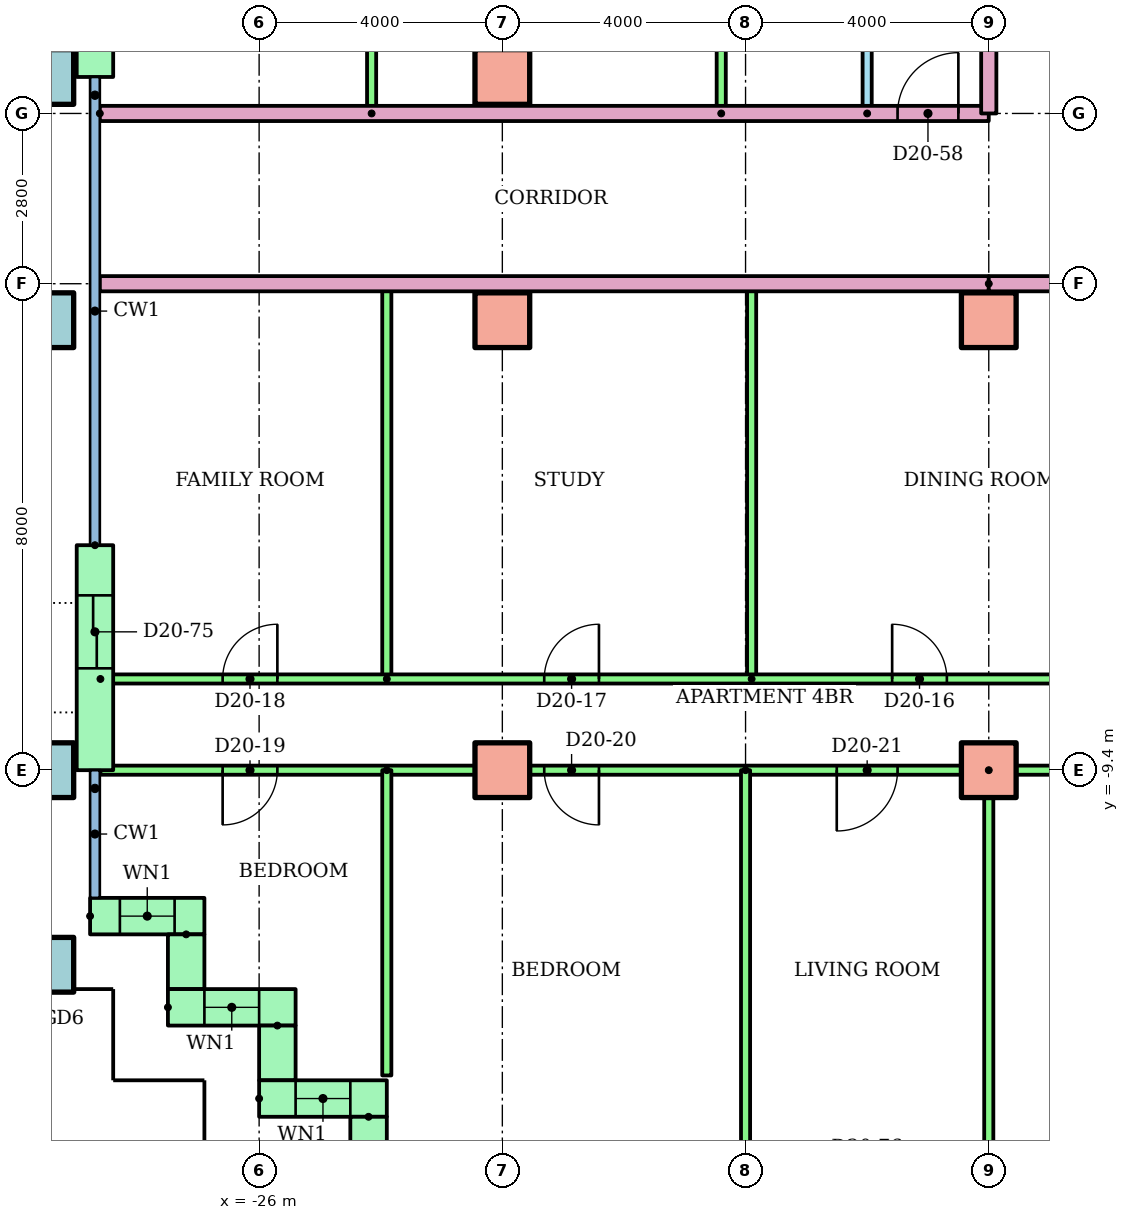
"""IFC4 building model, lengths in metres.
Left out: names, types, materials, properties, quantities, classifications, styles, units other than length and angle.
Written with IfcOpenShell. Run it as: python <this file> out.ifc"""

import sys

from ifc_helpers import new_model, si_unit, direction, frame, frame_2d, origin, origin_2d, place, context, subcontext, project, spatial, rectangle, hollow_rectangle, extrude, element, fill, save


model = new_model("IFC4")
c1 = context("Model", 3, precision=1e-05, world=origin(), true_north=direction((0.0, 1.0)))
c2 = subcontext(c1, "Body", "Model", "MODEL_VIEW")
j1 = project(units=[si_unit("LENGTHUNIT", "METRE"), si_unit("PLANEANGLEUNIT", "RADIAN")], contexts=[c1])
p1 = place(None, origin())
s1 = spatial("IfcSite", under=j1, at=p1, CompositionType="ELEMENT")
p2 = place(p1, origin())
s2 = spatial("IfcBuilding", under=s1, at=p2, CompositionType="ELEMENT")
p3 = place(p2, frame((0.0, 0.0, 80.7)))
s3 = spatial("IfcBuildingStorey", under=s2, at=p3, CompositionType="ELEMENT", Elevation=80.7)
for number, where in (
    (1, (-29.5, -12.6, 0.0)),
    (2, (-29.5, -9.4, 0.0)),
):
    element("IfcColumn", number, at=place(p3, frame(where)), inside=s3, PredefinedType="COLUMN", context=c2, shape_type="SweptSolid", body=[
        extrude(hollow_rectangle(XDim=0.9, YDim=0.9, WallThickness=0.045, at=origin_2d()), origin(), (0.0, 0.0, 1.0), 3.2),
    ])
for number, where in (
    (3, (-22.0, -9.4, 0.0)),
    (4, (-14.0, -9.4, 0.0)),
):
    element("IfcColumn", number, at=place(p3, frame(where)), inside=s3, PredefinedType="COLUMN", context=c2, shape_type="SweptSolid", body=[
        extrude(rectangle(XDim=0.9, YDim=0.9, at=origin_2d()), origin(), (0.0, 0.0, 1.0), 3.2),
    ])
p4 = place(p3, frame((-29.5, -2.0, 0.0)))
e5 = element("IfcColumn", 5, at=p4, inside=s3, PredefinedType="COLUMN", context=c2, shape_type="SweptSolid", body=[
    extrude(hollow_rectangle(XDim=0.9, YDim=0.9, WallThickness=0.045, at=origin_2d()), origin(), (0.0, 0.0, 1.0), 3.2),
])
for number, where in (
    (6, (-22.0, -2.0, 0.0)),
    (7, (-14.0, -2.0, 0.0)),
):
    element("IfcColumn", number, at=place(p3, frame(where)), inside=s3, PredefinedType="COLUMN", context=c2, shape_type="SweptSolid", body=[
        extrude(rectangle(XDim=0.9, YDim=0.9, at=origin_2d()), origin(), (0.0, 0.0, 1.0), 3.2),
    ])
p5 = place(p3, frame((-29.5, 2.0, 0.0)))
e8 = element("IfcColumn", 8, at=p5, inside=s3, PredefinedType="COLUMN", context=c2, shape_type="SweptSolid", body=[
    extrude(hollow_rectangle(XDim=0.9, YDim=0.9, WallThickness=0.045, at=origin_2d()), origin(), (0.0, 0.0, 1.0), 3.2),
])
p6 = place(p3, frame((-22.0, 2.0, 0.0)))
e9 = element("IfcColumn", 9, at=p6, inside=s3, PredefinedType="COLUMN", context=c2, shape_type="SweptSolid", body=[
    extrude(rectangle(XDim=0.9, YDim=0.9, at=origin_2d()), origin(), (0.0, 0.0, 1.0), 3.2),
])
p7 = place(p3, frame((-28.7, 6.5, 0.0), z_axis=(0.0, 0.0, 1.0), x_axis=(0.0, -1.0, 0.0)))
e10 = element("IfcWall", 10, at=p7, inside=s3, PredefinedType="STANDARD", context=c2, shape_type="SweptSolid", body=[
    extrude(rectangle(XDim=4.5, YDim=0.6, at=frame_2d((2.25, 0.0))), origin(), (0.0, 0.0, 1.0), 2.92),
])
p8 = place(p7, frame((1.65, 0.0, 0.0)))
e11 = element("IfcOpeningElement", 11, at=p8, cuts=e10, PredefinedType="OPENING", context=c2, shape_type="SweptSolid", body=[
    extrude(rectangle(XDim=1.2, YDim=2.1, at=frame_2d((0.6, 1.05))), frame((0.0, 0.31, 0.0), z_axis=(0.0, -1.0, 0.0), x_axis=(1.0, 0.0, 0.0)), (0.0, 0.0, 1.0), 0.62),
])
p9 = place(p3, frame((-28.7, -5.7, 0.0), z_axis=(0.0, 0.0, 1.0), x_axis=(0.0, -1.0, 0.0)))
e12 = element("IfcWall", 12, at=p9, inside=s3, PredefinedType="STANDARD", context=c2, shape_type="SweptSolid", body=[
    extrude(rectangle(XDim=3.7, YDim=0.6, at=frame_2d((1.85, 0.0))), origin(), (0.0, 0.0, 1.0), 2.92),
])
p10 = place(p9, frame((0.825, 0.0, 0.0)))
e13 = element("IfcOpeningElement", 13, at=p10, cuts=e12, PredefinedType="OPENING", context=c2, shape_type="SweptSolid", body=[
    extrude(rectangle(XDim=1.2, YDim=2.1, at=frame_2d((0.6, 1.05))), frame((0.0, 0.31, 0.0), z_axis=(0.0, -1.0, 0.0), x_axis=(1.0, 0.0, 0.0)), (0.0, 0.0, 1.0), 0.62),
])
p11 = place(p3, frame((-28.78, -11.8, 0.0)))
e14 = element("IfcWall", 14, at=p11, inside=s3, PredefinedType="STANDARD", context=c2, shape_type="SweptSolid", body=[
    extrude(rectangle(XDim=1.88, YDim=0.6, at=frame_2d((0.94, 0.0))), origin(), (0.0, 0.0, 1.0), 2.92),
])
p12 = place(p11, frame((0.49, 0.0, 0.9)))
e15 = element("IfcOpeningElement", 15, at=p12, cuts=e14, PredefinedType="OPENING", context=c2, shape_type="SweptSolid", body=[
    extrude(rectangle(XDim=0.9, YDim=1.5, at=frame_2d((0.45, 0.75))), frame((0.0, 0.31, 0.0), z_axis=(0.0, -1.0, 0.0), x_axis=(1.0, 0.0, 0.0)), (0.0, 0.0, 1.0), 0.62),
])
p13 = place(p3, frame((-27.2, -12.1, 0.0), z_axis=(0.0, 0.0, 1.0), x_axis=(0.0, -1.0, 0.0)))
e16 = element("IfcWall", 16, at=p13, inside=s3, PredefinedType="STANDARD", context=c2, shape_type="SweptSolid", body=[
    extrude(rectangle(XDim=0.9, YDim=0.6, at=frame_2d((0.45, 0.0))), origin(), (0.0, 0.0, 1.0), 2.92),
])
p14 = place(p3, frame((-27.5, -13.3, 0.0)))
e17 = element("IfcWall", 17, at=p14, inside=s3, PredefinedType="STANDARD", context=c2, shape_type="SweptSolid", body=[
    extrude(rectangle(XDim=2.1, YDim=0.6, at=frame_2d((1.05, 0.0))), origin(), (0.0, 0.0, 1.0), 2.92),
])
p15 = place(p14, frame((0.6, 0.0, 0.9)))
e18 = element("IfcOpeningElement", 18, at=p15, cuts=e17, PredefinedType="OPENING", context=c2, shape_type="SweptSolid", body=[
    extrude(rectangle(XDim=0.9, YDim=1.5, at=frame_2d((0.45, 0.75))), frame((0.0, 0.31, 0.0), z_axis=(0.0, -1.0, 0.0), x_axis=(1.0, 0.0, 0.0)), (0.0, 0.0, 1.0), 0.62),
])
p16 = place(p3, frame((-25.7, -13.6, 0.0), z_axis=(0.0, 0.0, 1.0), x_axis=(0.0, -1.0, 0.0)))
e19 = element("IfcWall", 19, at=p16, inside=s3, PredefinedType="STANDARD", context=c2, shape_type="SweptSolid", body=[
    extrude(rectangle(XDim=0.9, YDim=0.6, at=frame_2d((0.45, 0.0))), origin(), (0.0, 0.0, 1.0), 2.92),
])
p17 = place(p3, frame((-26.0, -14.8, 0.0)))
e20 = element("IfcWall", 20, at=p17, inside=s3, PredefinedType="STANDARD", context=c2, shape_type="SweptSolid", body=[
    extrude(rectangle(XDim=2.1, YDim=0.6, at=frame_2d((1.05, 0.0))), origin(), (0.0, 0.0, 1.0), 2.92),
])
p18 = place(p17, frame((0.6, 0.0, 0.9)))
e21 = element("IfcOpeningElement", 21, at=p18, cuts=e20, PredefinedType="OPENING", context=c2, shape_type="SweptSolid", body=[
    extrude(rectangle(XDim=0.9, YDim=1.5, at=frame_2d((0.45, 0.75))), frame((0.0, 0.31, 0.0), z_axis=(0.0, -1.0, 0.0), x_axis=(1.0, 0.0, 0.0)), (0.0, 0.0, 1.0), 0.62),
])
p19 = place(p3, frame((-24.2, -15.1, 0.0), z_axis=(0.0, 0.0, 1.0), x_axis=(0.0, -1.0, 0.0)))
e22 = element("IfcWall", 22, at=p19, inside=s3, PredefinedType="STANDARD", context=c2, shape_type="SweptSolid", body=[
    extrude(rectangle(XDim=1.28, YDim=0.6, at=frame_2d((0.64, 0.0))), origin(), (0.0, 0.0, 1.0), 2.92),
])
for number, where, z_axis, x_axis in (
    (23, (-17.9, -7.9, 0.0), (0.0, 0.0, 1.0), (0.0, 1.0, 0.0)),
    (24, (-23.9, -7.9, 0.0), (0.0, 0.0, 1.0), (0.0, 1.0, 0.0)),
):
    element("IfcWall", number, at=place(p3, frame(where, z_axis=z_axis, x_axis=x_axis)), inside=s3, PredefinedType="PARTITIONING", context=c2, shape_type="SweptSolid", body=[
        extrude(rectangle(XDim=6.5, YDim=0.15, at=frame_2d((3.25, 0.0))), origin(), (0.0, 0.0, 1.0), 2.4),
    ])
p20 = place(p3, frame((-28.61, -7.9, 0.0)))
e25 = element("IfcWall", 25, at=p20, inside=s3, PredefinedType="PARTITIONING", context=c2, shape_type="SweptSolid", body=[
    extrude(rectangle(XDim=20.61, YDim=0.15, at=frame_2d((10.305, 0.0))), origin(), (0.0, 0.0, 1.0), 2.4),
])
p21 = place(p20, frame((13.021, 0.0, 0.0)))
e26 = element("IfcOpeningElement", 26, at=p21, cuts=e25, PredefinedType="OPENING", context=c2, shape_type="SweptSolid", body=[
    extrude(rectangle(XDim=0.9, YDim=2.1, at=frame_2d((0.45, 1.05))), frame((0.0, 0.085, 0.0), z_axis=(0.0, -1.0, 0.0), x_axis=(1.0, 0.0, 0.0)), (0.0, 0.0, 1.0), 0.17),
])
p22 = place(p20, frame((7.299, 0.0, 0.0)))
e27 = element("IfcOpeningElement", 27, at=p22, cuts=e25, PredefinedType="OPENING", context=c2, shape_type="SweptSolid", body=[
    extrude(rectangle(XDim=0.9, YDim=2.1, at=frame_2d((0.45, 1.05))), frame((0.0, 0.085, 0.0), z_axis=(0.0, -1.0, 0.0), x_axis=(1.0, 0.0, 0.0)), (0.0, 0.0, 1.0), 0.17),
])
p23 = place(p20, frame((2.01, 0.0, 0.0)))
e28 = element("IfcOpeningElement", 28, at=p23, cuts=e25, PredefinedType="OPENING", context=c2, shape_type="SweptSolid", body=[
    extrude(rectangle(XDim=0.9, YDim=2.1, at=frame_2d((0.45, 1.05))), frame((0.0, 0.085, 0.0), z_axis=(0.0, -1.0, 0.0), x_axis=(1.0, 0.0, 0.0)), (0.0, 0.0, 1.0), 0.17),
])
p24 = place(p3, frame((-6.0, -9.4, 0.0), z_axis=(0.0, 0.0, 1.0), x_axis=(-1.0, 0.0, 0.0)))
e29 = element("IfcWall", 29, at=p24, inside=s3, PredefinedType="PARTITIONING", context=c2, shape_type="SweptSolid", body=[
    extrude(rectangle(XDim=22.61, YDim=0.15, at=frame_2d((11.305, 0.0))), origin(), (0.0, 0.0, 1.0), 2.4),
])
p25 = place(p24, frame((19.7, 0.0, 0.0)))
e30 = element("IfcOpeningElement", 30, at=p25, cuts=e29, PredefinedType="OPENING", context=c2, shape_type="SweptSolid", body=[
    extrude(rectangle(XDim=0.9, YDim=2.1, at=frame_2d((0.45, 1.05))), frame((0.0, 0.085, 0.0), z_axis=(0.0, -1.0, 0.0), x_axis=(1.0, 0.0, 0.0)), (0.0, 0.0, 1.0), 0.17),
])
p26 = place(p24, frame((14.411, 0.0, 0.0)))
e31 = element("IfcOpeningElement", 31, at=p26, cuts=e29, PredefinedType="OPENING", context=c2, shape_type="SweptSolid", body=[
    extrude(rectangle(XDim=0.9, YDim=2.1, at=frame_2d((0.45, 1.05))), frame((0.0, 0.085, 0.0), z_axis=(0.0, -1.0, 0.0), x_axis=(1.0, 0.0, 0.0)), (0.0, 0.0, 1.0), 0.17),
])
p27 = place(p24, frame((9.5, 0.0, 0.0)))
e32 = element("IfcOpeningElement", 32, at=p27, cuts=e29, PredefinedType="OPENING", context=c2, shape_type="SweptSolid", body=[
    extrude(rectangle(XDim=1.0, YDim=2.1, at=frame_2d((0.5, 1.05))), frame((0.0, 0.085, 0.0), z_axis=(0.0, -1.0, 0.0), x_axis=(1.0, 0.0, 0.0)), (0.0, 0.0, 1.0), 0.17),
])
p28 = place(p24, frame((5.55, 0.0, 0.0)))
e33 = element("IfcOpeningElement", 33, at=p28, cuts=e29, PredefinedType="OPENING", context=c2, shape_type="SweptSolid", body=[
    extrude(rectangle(XDim=0.9, YDim=2.1, at=frame_2d((0.45, 1.05))), frame((0.0, 0.085, 0.0), z_axis=(0.0, -1.0, 0.0), x_axis=(1.0, 0.0, 0.0)), (0.0, 0.0, 1.0), 0.17),
])
p29 = place(p24, frame((1.55, 0.0, 0.0)))
e34 = element("IfcOpeningElement", 34, at=p29, cuts=e29, PredefinedType="OPENING", context=c2, shape_type="SweptSolid", body=[
    extrude(rectangle(XDim=0.9, YDim=2.1, at=frame_2d((0.45, 1.05))), frame((0.0, 0.085, 0.0), z_axis=(0.0, -1.0, 0.0), x_axis=(1.0, 0.0, 0.0)), (0.0, 0.0, 1.0), 0.17),
])
p30 = place(p3, frame((-23.9, -9.4, 0.0), z_axis=(0.0, 0.0, 1.0), x_axis=(0.0, -1.0, 0.0)))
e35 = element("IfcWall", 35, at=p30, inside=s3, PredefinedType="PARTITIONING", context=c2, shape_type="SweptSolid", body=[
    extrude(rectangle(XDim=5.02, YDim=0.15, at=frame_2d((2.51, 0.0))), origin(), (0.0, 0.0, 1.0), 2.4),
])
p31 = place(p3, frame((-18.0, -9.4, 0.0), z_axis=(0.0, 0.0, 1.0), x_axis=(0.0, -1.0, 0.0)))
e36 = element("IfcWall", 36, at=p31, inside=s3, PredefinedType="PARTITIONING", context=c2, shape_type="SweptSolid", body=[
    extrude(rectangle(XDim=6.821, YDim=0.15, at=frame_2d((3.411, 0.0))), origin(), (0.0, 0.0, 1.0), 2.4),
])
p32 = place(p3, frame((-14.0, -9.4, 0.0), z_axis=(0.0, 0.0, 1.0), x_axis=(0.0, -1.0, 0.0)))
e37 = element("IfcWall", 37, at=p32, inside=s3, PredefinedType="PARTITIONING", context=c2, shape_type="SweptSolid", body=[
    extrude(rectangle(XDim=6.81, YDim=0.15, at=frame_2d((3.405, 0.0))), origin(), (0.0, 0.0, 1.0), 2.4),
])
p33 = place(p3, frame((-14.0, -1.4, 0.0), z_axis=(0.0, 0.0, 1.0), x_axis=(-1.0, 0.0, 0.0)))
e38 = element("IfcWall", 38, at=p33, inside=s3, PredefinedType="PARTITIONING", context=c2, shape_type="SweptSolid", body=[
    extrude(rectangle(XDim=14.62, YDim=0.25, at=frame_2d((7.31, 0.0))), origin(), (0.0, 0.0, 1.0), 2.4),
])
p34 = place(p3, frame((-16.0, 1.4, 0.0), z_axis=(0.0, 0.0, 1.0), x_axis=(0.0, 1.0, 0.0)))
e39 = element("IfcWall", 39, at=p34, inside=s3, PredefinedType="PARTITIONING", context=c2, shape_type="SweptSolid", body=[
    extrude(rectangle(XDim=8.9, YDim=0.15, at=frame_2d((4.45, 0.0))), origin(), (0.0, 0.0, 1.0), 2.4),
])
p35 = place(p34, frame((2.05, 0.0, 0.0)))
e40 = element("IfcOpeningElement", 40, at=p35, cuts=e39, PredefinedType="OPENING", context=c2, shape_type="SweptSolid", body=[
    extrude(rectangle(XDim=0.9, YDim=2.1, at=frame_2d((0.45, 1.05))), frame((0.0, 0.085, 0.0), z_axis=(0.0, -1.0, 0.0), x_axis=(1.0, 0.0, 0.0)), (0.0, 0.0, 1.0), 0.17),
])
p36 = place(p34, frame((6.55, 0.0, 0.0)))
e41 = element("IfcOpeningElement", 41, at=p36, cuts=e39, PredefinedType="OPENING", context=c2, shape_type="SweptSolid", body=[
    extrude(rectangle(XDim=0.8, YDim=2.1, at=frame_2d((0.4, 1.05))), frame((0.0, 0.085, 0.0), z_axis=(0.0, -1.0, 0.0), x_axis=(1.0, 0.0, 0.0)), (0.0, 0.0, 1.0), 0.17),
])
for number, where, z_axis, x_axis in (
    (42, (-18.4, 1.4, 0.0), (0.0, 0.0, 1.0), (0.0, 1.0, 0.0)),
    (43, (-24.15, 1.4, 0.0), (0.0, 0.0, 1.0), (0.0, 1.0, 0.0)),
):
    element("IfcWall", number, at=place(p3, frame(where, z_axis=z_axis, x_axis=x_axis)), inside=s3, PredefinedType="PARTITIONING", context=c2, shape_type="SweptSolid", body=[
        extrude(rectangle(XDim=8.9, YDim=0.15, at=frame_2d((4.45, 0.0))), origin(), (0.0, 0.0, 1.0), 2.4),
    ])
p37 = place(p3, frame((-28.62, 1.4, 0.0)))
e44 = element("IfcWall", 44, at=p37, inside=s3, PredefinedType="PARTITIONING", context=c2, shape_type="SweptSolid", body=[
    extrude(rectangle(XDim=14.62, YDim=0.25, at=frame_2d((7.31, 0.0))), origin(), (0.0, 0.0, 1.0), 2.4),
])
p38 = place(p37, frame((13.12, 0.0, 0.0)))
e45 = element("IfcOpeningElement", 45, at=p38, cuts=e44, PredefinedType="OPENING", context=c2, shape_type="SweptSolid", body=[
    extrude(rectangle(XDim=1.0, YDim=2.1, at=frame_2d((0.5, 1.05))), frame((0.0, 0.135, 0.0), z_axis=(0.0, -1.0, 0.0), x_axis=(1.0, 0.0, 0.0)), (0.0, 0.0, 1.0), 0.27),
])
p39 = place(p3, frame((14.0, -1.4, 0.0), z_axis=(0.0, 0.0, 1.0), x_axis=(-1.0, 0.0, 0.0)))
e46 = element("IfcWall", 46, at=p39, inside=s3, PredefinedType="PARTITIONING", context=c2, shape_type="SweptSolid", body=[
    extrude(rectangle(XDim=28.0, YDim=0.25, at=frame_2d((14.0, 0.0))), origin(), (0.0, 0.0, 1.0), 2.4),
])
p40 = place(p39, frame((20.689, 0.0, 0.0)))
e47 = element("IfcOpeningElement", 47, at=p40, cuts=e46, PredefinedType="OPENING", context=c2, shape_type="SweptSolid", body=[
    extrude(rectangle(XDim=1.0, YDim=2.1, at=frame_2d((0.5, 1.05))), frame((0.0, 0.135, 0.0), z_axis=(0.0, -1.0, 0.0), x_axis=(1.0, 0.0, 0.0)), (0.0, 0.0, 1.0), 0.27),
])
p41 = place(p39, frame((18.311, 0.0, 0.0)))
e48 = element("IfcOpeningElement", 48, at=p41, cuts=e46, PredefinedType="OPENING", context=c2, shape_type="SweptSolid", body=[
    extrude(rectangle(XDim=1.0, YDim=2.1, at=frame_2d((0.5, 1.05))), frame((0.0, 0.135, 0.0), z_axis=(0.0, -1.0, 0.0), x_axis=(1.0, 0.0, 0.0)), (0.0, 0.0, 1.0), 0.27),
])
p42 = place(p39, frame((2.311, 0.0, 0.0)))
e49 = element("IfcOpeningElement", 49, at=p42, cuts=e46, PredefinedType="OPENING", context=c2, shape_type="SweptSolid", body=[
    extrude(rectangle(XDim=1.0, YDim=2.1, at=frame_2d((0.5, 1.05))), frame((0.0, 0.135, 0.0), z_axis=(0.0, -1.0, 0.0), x_axis=(1.0, 0.0, 0.0)), (0.0, 0.0, 1.0), 0.27),
])
p43 = place(p3, frame((-14.0, 3.0, 0.0), z_axis=(0.0, 0.0, 1.0), x_axis=(0.0, -1.0, 0.0)))
e50 = element("IfcWall", 50, at=p43, inside=s3, PredefinedType="PARTITIONING", context=c2, shape_type="SweptSolid", body=[
    extrude(rectangle(XDim=1.6, YDim=0.25, at=frame_2d((0.8, 0.0))), origin(), (0.0, 0.0, 1.0), 2.4),
])
p44 = place(p12, origin())
e51 = element("IfcWindow", 51, at=p44, inside=s3, PartitioningType="SINGLE_PANEL", PredefinedType="WINDOW", context=c2, shape_type="SweptSolid", body=[
    extrude(rectangle(XDim=0.9, YDim=1.5, at=frame_2d((0.45, 0.75))), frame((0.0, 0.03, 0.0), z_axis=(0.0, -1.0, 0.0), x_axis=(1.0, 0.0, 0.0)), (0.0, 0.0, 1.0), 0.06),
])
fill(e15, e51)
p45 = place(p15, origin())
e52 = element("IfcWindow", 52, at=p45, inside=s3, PartitioningType="SINGLE_PANEL", PredefinedType="WINDOW", context=c2, shape_type="SweptSolid", body=[
    extrude(rectangle(XDim=0.9, YDim=1.5, at=frame_2d((0.45, 0.75))), frame((0.0, 0.03, 0.0), z_axis=(0.0, -1.0, 0.0), x_axis=(1.0, 0.0, 0.0)), (0.0, 0.0, 1.0), 0.06),
])
fill(e18, e52)
p46 = place(p18, origin())
e53 = element("IfcWindow", 53, at=p46, inside=s3, PartitioningType="SINGLE_PANEL", PredefinedType="WINDOW", context=c2, shape_type="SweptSolid", body=[
    extrude(rectangle(XDim=0.9, YDim=1.5, at=frame_2d((0.45, 0.75))), frame((0.0, 0.03, 0.0), z_axis=(0.0, -1.0, 0.0), x_axis=(1.0, 0.0, 0.0)), (0.0, 0.0, 1.0), 0.06),
])
fill(e21, e53)
p47 = place(p21, origin())
e54 = element("IfcDoor", 54, at=p47, inside=s3, OperationType="SINGLE_SWING_LEFT", PredefinedType="DOOR", context=c2, shape_type="SweptSolid", body=[
    extrude(rectangle(XDim=0.9, YDim=2.1, at=frame_2d((0.45, 1.05))), frame((0.0, 0.025, 0.0), z_axis=(0.0, -1.0, 0.0), x_axis=(1.0, 0.0, 0.0)), (0.0, 0.0, 1.0), 0.05),
])
fill(e26, e54)
p48 = place(p22, origin())
e55 = element("IfcDoor", 55, at=p48, inside=s3, OperationType="SINGLE_SWING_RIGHT", PredefinedType="DOOR", context=c2, shape_type="SweptSolid", body=[
    extrude(rectangle(XDim=0.9, YDim=2.1, at=frame_2d((0.45, 1.05))), frame((0.0, 0.025, 0.0), z_axis=(0.0, -1.0, 0.0), x_axis=(1.0, 0.0, 0.0)), (0.0, 0.0, 1.0), 0.05),
])
fill(e27, e55)
p49 = place(p23, origin())
e56 = element("IfcDoor", 56, at=p49, inside=s3, OperationType="SINGLE_SWING_RIGHT", PredefinedType="DOOR", context=c2, shape_type="SweptSolid", body=[
    extrude(rectangle(XDim=0.9, YDim=2.1, at=frame_2d((0.45, 1.05))), frame((0.0, 0.025, 0.0), z_axis=(0.0, -1.0, 0.0), x_axis=(1.0, 0.0, 0.0)), (0.0, 0.0, 1.0), 0.05),
])
fill(e28, e56)
p50 = place(p25, origin())
e57 = element("IfcDoor", 57, at=p50, inside=s3, OperationType="SINGLE_SWING_RIGHT", PredefinedType="DOOR", context=c2, shape_type="SweptSolid", body=[
    extrude(rectangle(XDim=0.9, YDim=2.1, at=frame_2d((0.45, 1.05))), frame((0.0, 0.025, 0.0), z_axis=(0.0, -1.0, 0.0), x_axis=(1.0, 0.0, 0.0)), (0.0, 0.0, 1.0), 0.05),
])
fill(e30, e57)
p51 = place(p26, origin())
e58 = element("IfcDoor", 58, at=p51, inside=s3, OperationType="SINGLE_SWING_LEFT", PredefinedType="DOOR", context=c2, shape_type="SweptSolid", body=[
    extrude(rectangle(XDim=0.9, YDim=2.1, at=frame_2d((0.45, 1.05))), frame((0.0, 0.025, 0.0), z_axis=(0.0, -1.0, 0.0), x_axis=(1.0, 0.0, 0.0)), (0.0, 0.0, 1.0), 0.05),
])
fill(e31, e58)
p52 = place(p27, origin())
e59 = element("IfcDoor", 59, at=p52, inside=s3, OperationType="SINGLE_SWING_RIGHT", PredefinedType="DOOR", context=c2, shape_type="SweptSolid", body=[
    extrude(rectangle(XDim=1.0, YDim=2.1, at=frame_2d((0.5, 1.05))), frame((0.0, 0.025, 0.0), z_axis=(0.0, -1.0, 0.0), x_axis=(1.0, 0.0, 0.0)), (0.0, 0.0, 1.0), 0.05),
])
fill(e32, e59)
p53 = place(p38, origin())
e60 = element("IfcDoor", 60, at=p53, inside=s3, OperationType="SINGLE_SWING_RIGHT", PredefinedType="DOOR", context=c2, shape_type="SweptSolid", body=[
    extrude(rectangle(XDim=1.0, YDim=2.1, at=frame_2d((0.5, 1.05))), frame((0.0, 0.025, 0.0), z_axis=(0.0, -1.0, 0.0), x_axis=(1.0, 0.0, 0.0)), (0.0, 0.0, 1.0), 0.05),
])
fill(e45, e60)
p54 = place(p10, origin())
e61 = element("IfcDoor", 61, at=p54, inside=s3, OperationType="SLIDING_TO_LEFT", PredefinedType="DOOR", context=c2, shape_type="SweptSolid", body=[
    extrude(rectangle(XDim=1.2, YDim=2.1, at=frame_2d((0.6, 1.05))), frame((0.0, 0.025, 0.0), z_axis=(0.0, -1.0, 0.0), x_axis=(1.0, 0.0, 0.0)), (0.0, 0.0, 1.0), 0.05),
])
fill(e13, e61)
save(model, sys.argv[1])
